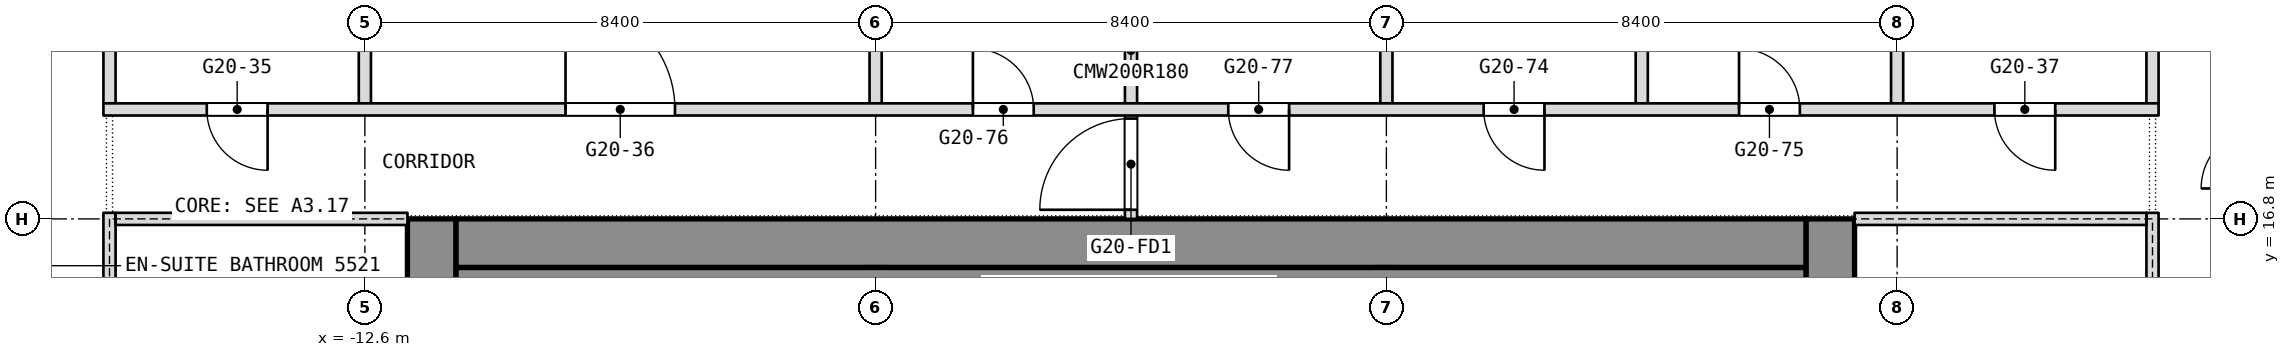
"""IFC4 building model, lengths in metres.
Left out: names, types, materials, properties, quantities, classifications, styles, units other than length and angle.
Written with IfcOpenShell. Run it as: python <this file> out.ifc"""

import sys

from ifc_helpers import new_model, si_unit, direction, frame, frame_2d, origin, place, context, subcontext, project, spatial, rectangle, extrude, element, fill, save


model = new_model("IFC4")
c1 = context("Model", 3, precision=1e-05, world=origin(), true_north=direction((0.0, 1.0)))
c2 = subcontext(c1, "Body", "Model", "MODEL_VIEW")
j1 = project(units=[si_unit("LENGTHUNIT", "METRE"), si_unit("PLANEANGLEUNIT", "RADIAN")], contexts=[c1])
p1 = place(None, origin())
s1 = spatial("IfcSite", under=j1, at=p1, CompositionType="ELEMENT")
p2 = place(p1, origin())
s2 = spatial("IfcBuilding", under=s1, at=p2, CompositionType="ELEMENT")
p3 = place(p2, frame((0.0, 0.0, 234.5)))
s3 = spatial("IfcBuildingStorey", under=s2, at=p3, CompositionType="ELEMENT", Elevation=234.5)
p4 = place(p3, frame((11.5, 0.0, 0.0), z_axis=(0.0, 0.0, 1.0), x_axis=(0.0, 1.0, 0.0)))
e1 = element("IfcWall", 1, at=p4, inside=s3, PredefinedType="SHEAR", context=c2, shape_type="SweptSolid", body=[
    extrude(rectangle(XDim=16.8, YDim=0.8, at=frame_2d((8.4, 0.0))), origin(), (0.0, 0.0, 1.0), 3.6),
])
p5 = place(p4, frame((2.3, 0.0, 0.0)))
e2 = element("IfcOpeningElement", 2, at=p5, cuts=e1, PredefinedType="OPENING", context=c2, shape_type="SweptSolid", body=[
    extrude(rectangle(XDim=1.1, YDim=2.1, at=frame_2d((0.55, 1.05))), frame((0.0, 0.4, 0.0), z_axis=(0.0, -1.0, 0.0), x_axis=(1.0, 0.0, 0.0)), (0.0, 0.0, 1.0), 0.8),
])
p6 = place(p4, frame((4.85, 0.0, 0.0)))
e3 = element("IfcOpeningElement", 3, at=p6, cuts=e1, PredefinedType="OPENING", context=c2, shape_type="SweptSolid", body=[
    extrude(rectangle(XDim=1.1, YDim=2.1, at=frame_2d((0.55, 1.05))), frame((0.0, 0.4, 0.0), z_axis=(0.0, -1.0, 0.0), x_axis=(1.0, 0.0, 0.0)), (0.0, 0.0, 1.0), 0.8),
])
p7 = place(p4, frame((6.825, 0.0, 0.0)))
e4 = element("IfcOpeningElement", 4, at=p7, cuts=e1, PredefinedType="OPENING", context=c2, shape_type="SweptSolid", body=[
    extrude(rectangle(XDim=1.2, YDim=2.1, at=frame_2d((0.6, 1.05))), frame((0.0, 0.4, 0.0), z_axis=(0.0, -1.0, 0.0), x_axis=(1.0, 0.0, 0.0)), (0.0, 0.0, 1.0), 0.8),
])
p8 = place(p4, frame((13.4, 0.0, 0.0)))
e5 = element("IfcOpeningElement", 5, at=p8, cuts=e1, PredefinedType="OPENING", context=c2, shape_type="SweptSolid", body=[
    extrude(rectangle(XDim=1.1, YDim=2.1, at=frame_2d((0.55, 1.05))), frame((0.0, 0.4, 0.0), z_axis=(0.0, -1.0, 0.0), x_axis=(1.0, 0.0, 0.0)), (0.0, 0.0, 1.0), 0.8),
])
p9 = place(p4, frame((10.85, 0.0, 0.0)))
e6 = element("IfcOpeningElement", 6, at=p9, cuts=e1, PredefinedType="OPENING", context=c2, shape_type="SweptSolid", body=[
    extrude(rectangle(XDim=1.1, YDim=2.1, at=frame_2d((0.55, 1.05))), frame((0.0, 0.4, 0.0), z_axis=(0.0, -1.0, 0.0), x_axis=(1.0, 0.0, 0.0)), (0.0, 0.0, 1.0), 0.8),
])
p10 = place(p4, frame((8.775, 0.0, 0.0)))
e7 = element("IfcOpeningElement", 7, at=p10, cuts=e1, PredefinedType="OPENING", context=c2, shape_type="SweptSolid", body=[
    extrude(rectangle(XDim=1.2, YDim=2.1, at=frame_2d((0.6, 1.05))), frame((0.0, 0.4, 0.0), z_axis=(0.0, -1.0, 0.0), x_axis=(1.0, 0.0, 0.0)), (0.0, 0.0, 1.0), 0.8),
])
p11 = place(p3, frame((-11.5, 0.0, 0.0), z_axis=(0.0, 0.0, 1.0), x_axis=(0.0, 1.0, 0.0)))
e8 = element("IfcWall", 8, at=p11, inside=s3, PredefinedType="SHEAR", context=c2, shape_type="SweptSolid", body=[
    extrude(rectangle(XDim=16.8, YDim=0.8, at=frame_2d((8.4, 0.0))), origin(), (0.0, 0.0, 1.0), 3.6),
])
p12 = place(p11, frame((3.6, 0.0, 0.0)))
e9 = element("IfcOpeningElement", 9, at=p12, cuts=e8, PredefinedType="OPENING", context=c2, shape_type="SweptSolid", body=[
    extrude(rectangle(XDim=0.9, YDim=2.1, at=frame_2d((0.45, 1.05))), frame((0.0, 0.4, 0.0), z_axis=(0.0, -1.0, 0.0), x_axis=(1.0, 0.0, 0.0)), (0.0, 0.0, 1.0), 0.8),
])
p13 = place(p11, frame((6.825, 0.0, 0.0)))
e10 = element("IfcOpeningElement", 10, at=p13, cuts=e8, PredefinedType="OPENING", context=c2, shape_type="SweptSolid", body=[
    extrude(rectangle(XDim=1.2, YDim=2.1, at=frame_2d((0.6, 1.05))), frame((0.0, 0.4, 0.0), z_axis=(0.0, -1.0, 0.0), x_axis=(1.0, 0.0, 0.0)), (0.0, 0.0, 1.0), 0.8),
])
p14 = place(p11, frame((14.212, 0.0, 0.0)))
e11 = element("IfcOpeningElement", 11, at=p14, cuts=e8, PredefinedType="OPENING", context=c2, shape_type="SweptSolid", body=[
    extrude(rectangle(XDim=0.9, YDim=2.1, at=frame_2d((0.45, 1.05))), frame((0.0, 0.4, 0.0), z_axis=(0.0, -1.0, 0.0), x_axis=(1.0, 0.0, 0.0)), (0.0, 0.0, 1.0), 0.8),
])
p15 = place(p11, frame((11.587, 0.0, 0.0)))
e12 = element("IfcOpeningElement", 12, at=p15, cuts=e8, PredefinedType="OPENING", context=c2, shape_type="SweptSolid", body=[
    extrude(rectangle(XDim=0.9, YDim=2.1, at=frame_2d((0.45, 1.05))), frame((0.0, 0.4, 0.0), z_axis=(0.0, -1.0, 0.0), x_axis=(1.0, 0.0, 0.0)), (0.0, 0.0, 1.0), 0.8),
])
p16 = place(p11, frame((8.775, 0.0, 0.0)))
e13 = element("IfcOpeningElement", 13, at=p16, cuts=e8, PredefinedType="OPENING", context=c2, shape_type="SweptSolid", body=[
    extrude(rectangle(XDim=1.2, YDim=2.1, at=frame_2d((0.6, 1.05))), frame((0.0, 0.4, 0.0), z_axis=(0.0, -1.0, 0.0), x_axis=(1.0, 0.0, 0.0)), (0.0, 0.0, 1.0), 0.8),
])
p17 = place(p3, frame((-11.1, 16.4, 0.0), z_axis=(0.0, 0.0, 1.0), x_axis=(1.0, 0.0, 0.0)))
e14 = element("IfcWall", 14, at=p17, inside=s3, PredefinedType="SHEAR", context=c2, shape_type="SweptSolid", body=[
    extrude(rectangle(XDim=22.2, YDim=0.8, at=frame_2d((11.1, 0.0))), origin(), (0.0, 0.0, 1.0), 3.6),
])
p18 = place(p3, frame((-4.2, 0.8, 0.0), z_axis=(0.0, 0.0, 1.0), x_axis=(0.0, 1.0, 0.0)))
e15 = element("IfcWall", 15, at=p18, inside=s3, PredefinedType="SHEAR", context=c2, shape_type="SweptSolid", body=[
    extrude(rectangle(XDim=15.2, YDim=0.4, at=frame_2d((7.6, 0.0))), origin(), (0.0, 0.0, 1.0), 3.6),
])
p19 = place(p18, frame((8.5, 0.0, 0.0)))
e16 = element("IfcOpeningElement", 16, at=p19, cuts=e15, PredefinedType="OPENING", context=c2, shape_type="SweptSolid", body=[
    extrude(rectangle(XDim=1.2, YDim=2.1, at=frame_2d((0.6, 1.05))), frame((0.0, 0.2, 0.0), z_axis=(0.0, -1.0, 0.0), x_axis=(1.0, 0.0, 0.0)), (0.0, 0.0, 1.0), 0.4),
])
p20 = place(p3, frame((4.2, 0.8, 0.0), z_axis=(0.0, 0.0, 1.0), x_axis=(0.0, 1.0, 0.0)))
e17 = element("IfcWall", 17, at=p20, inside=s3, PredefinedType="SHEAR", context=c2, shape_type="SweptSolid", body=[
    extrude(rectangle(XDim=15.2, YDim=0.4, at=frame_2d((7.6, 0.0))), origin(), (0.0, 0.0, 1.0), 3.6),
])
p21 = place(p20, frame((5.95, 0.0, 0.0)))
e18 = element("IfcOpeningElement", 18, at=p21, cuts=e17, PredefinedType="OPENING", context=c2, shape_type="SweptSolid", body=[
    extrude(rectangle(XDim=1.2, YDim=2.1, at=frame_2d((0.6, 1.05))), frame((0.0, 0.2, 0.0), z_axis=(0.0, -1.0, 0.0), x_axis=(1.0, 0.0, 0.0)), (0.0, 0.0, 1.0), 0.4),
])
for number, where, z_axis, x_axis in (
    (19, (16.8, 18.7, 0.0), (0.0, 0.0, 1.0), (0.0, 1.0, 0.0)),
    (20, (12.6, 18.7, 0.0), (0.0, 0.0, 1.0), (0.0, 1.0, 0.0)),
    (21, (8.4, 18.7, 0.0), (0.0, 0.0, 1.0), (0.0, 1.0, 0.0)),
    (22, (4.2, 18.7, 0.0), (0.0, 0.0, 1.0), (0.0, 1.0, 0.0)),
):
    element("IfcWall", number, at=place(p3, frame(where, z_axis=z_axis, x_axis=x_axis)), inside=s3, PredefinedType="PARTITIONING", context=c2, shape_type="SweptSolid", body=[
        extrude(rectangle(XDim=3.64, YDim=0.2, at=frame_2d((1.82, 0.0))), origin(), (0.0, 0.0, 1.0), 3.34),
    ])
p22 = place(p3, frame((0.0, 16.8, 0.0), z_axis=(0.0, 0.0, 1.0), x_axis=(0.0, 1.0, 0.0)))
e23 = element("IfcWall", 23, at=p22, inside=s3, PredefinedType="PARTITIONING", context=c2, shape_type="SweptSolid", body=[
    extrude(rectangle(XDim=5.54, YDim=0.2, at=frame_2d((2.77, 0.0))), origin(), (0.0, 0.0, 1.0), 3.34),
])
p23 = place(p22, frame((0.15, 0.0, 0.0)))
e24 = element("IfcOpeningElement", 24, at=p23, cuts=e23, PredefinedType="OPENING", context=c2, shape_type="SweptSolid", body=[
    extrude(rectangle(XDim=1.5, YDim=2.1, at=frame_2d((0.75, 1.05))), frame((0.0, 0.1, 0.0), z_axis=(0.0, -1.0, 0.0), x_axis=(1.0, 0.0, 0.0)), (0.0, 0.0, 1.0), 0.2),
])
for number, where, z_axis, x_axis in (
    (25, (-4.2, 18.7, 0.0), (0.0, 0.0, 1.0), (0.0, 1.0, 0.0)),
    (26, (-12.6, 18.7, 0.0), (0.0, 0.0, 1.0), (0.0, 1.0, 0.0)),
    (27, (-16.8, 18.7, 0.0), (0.0, 0.0, 1.0), (0.0, 1.0, 0.0)),
):
    element("IfcWall", number, at=place(p3, frame(where, z_axis=z_axis, x_axis=x_axis)), inside=s3, PredefinedType="PARTITIONING", context=c2, shape_type="SweptSolid", body=[
        extrude(rectangle(XDim=3.64, YDim=0.2, at=frame_2d((1.82, 0.0))), origin(), (0.0, 0.0, 1.0), 3.34),
    ])
p24 = place(p3, frame((-16.9, 18.6, 0.0), z_axis=(0.0, 0.0, 1.0), x_axis=(1.0, 0.0, 0.0)))
e28 = element("IfcWall", 28, at=p24, inside=s3, PredefinedType="PARTITIONING", context=c2, shape_type="SweptSolid", body=[
    extrude(rectangle(XDim=33.8, YDim=0.2, at=frame_2d((16.9, 0.0))), origin(), (0.0, 0.0, 1.0), 3.34),
])
p25 = place(p24, frame((1.7, 0.0, 0.0)))
e29 = element("IfcOpeningElement", 29, at=p25, cuts=e28, PredefinedType="OPENING", context=c2, shape_type="SweptSolid", body=[
    extrude(rectangle(XDim=1.0, YDim=2.1, at=frame_2d((0.5, 1.05))), frame((0.0, 0.1, 0.0), z_axis=(0.0, -1.0, 0.0), x_axis=(1.0, 0.0, 0.0)), (0.0, 0.0, 1.0), 0.2),
])
p26 = place(p24, frame((7.6, 0.0, 0.0)))
e30 = element("IfcOpeningElement", 30, at=p26, cuts=e28, PredefinedType="OPENING", context=c2, shape_type="SweptSolid", body=[
    extrude(rectangle(XDim=1.8, YDim=2.1, at=frame_2d((0.9, 1.05))), frame((0.0, 0.1, 0.0), z_axis=(0.0, -1.0, 0.0), x_axis=(1.0, 0.0, 0.0)), (0.0, 0.0, 1.0), 0.2),
])
p27 = place(p24, frame((31.1, 0.0, 0.0)))
e31 = element("IfcOpeningElement", 31, at=p27, cuts=e28, PredefinedType="OPENING", context=c2, shape_type="SweptSolid", body=[
    extrude(rectangle(XDim=1.0, YDim=2.1, at=frame_2d((0.5, 1.05))), frame((0.0, 0.1, 0.0), z_axis=(0.0, -1.0, 0.0), x_axis=(1.0, 0.0, 0.0)), (0.0, 0.0, 1.0), 0.2),
])
p28 = place(p24, frame((22.7, 0.0, 0.0)))
e32 = element("IfcOpeningElement", 32, at=p28, cuts=e28, PredefinedType="OPENING", context=c2, shape_type="SweptSolid", body=[
    extrude(rectangle(XDim=1.0, YDim=2.1, at=frame_2d((0.5, 1.05))), frame((0.0, 0.1, 0.0), z_axis=(0.0, -1.0, 0.0), x_axis=(1.0, 0.0, 0.0)), (0.0, 0.0, 1.0), 0.2),
])
p29 = place(p24, frame((26.9, 0.0, 0.0)))
e33 = element("IfcOpeningElement", 33, at=p29, cuts=e28, PredefinedType="OPENING", context=c2, shape_type="SweptSolid", body=[
    extrude(rectangle(XDim=1.0, YDim=2.1, at=frame_2d((0.5, 1.05))), frame((0.0, 0.1, 0.0), z_axis=(0.0, -1.0, 0.0), x_axis=(1.0, 0.0, 0.0)), (0.0, 0.0, 1.0), 0.2),
])
p30 = place(p24, frame((14.3, 0.0, 0.0)))
e34 = element("IfcOpeningElement", 34, at=p30, cuts=e28, PredefinedType="OPENING", context=c2, shape_type="SweptSolid", body=[
    extrude(rectangle(XDim=1.0, YDim=2.1, at=frame_2d((0.5, 1.05))), frame((0.0, 0.1, 0.0), z_axis=(0.0, -1.0, 0.0), x_axis=(1.0, 0.0, 0.0)), (0.0, 0.0, 1.0), 0.2),
])
p31 = place(p24, frame((18.5, 0.0, 0.0)))
e35 = element("IfcOpeningElement", 35, at=p31, cuts=e28, PredefinedType="OPENING", context=c2, shape_type="SweptSolid", body=[
    extrude(rectangle(XDim=1.0, YDim=2.1, at=frame_2d((0.5, 1.05))), frame((0.0, 0.1, 0.0), z_axis=(0.0, -1.0, 0.0), x_axis=(1.0, 0.0, 0.0)), (0.0, 0.0, 1.0), 0.2),
])
p32 = place(p3, frame((-11.1, 15.65, 0.0), z_axis=(0.0, 0.0, 1.0), x_axis=(1.0, 0.0, 0.0)))
e36 = element("IfcWall", 36, at=p32, inside=s3, PredefinedType="PARTITIONING", context=c2, shape_type="SweptSolid", body=[
    extrude(rectangle(XDim=22.2, YDim=0.7, at=frame_2d((11.1, 0.0))), origin(), (0.0, 0.0, 1.0), 3.34),
])
p33 = place(p3, frame((-16.8, -0.1, 0.0), z_axis=(0.0, 0.0, 1.0), x_axis=(0.0, 1.0, 0.0)))
e37 = element("IfcWall", 37, at=p33, inside=s3, PredefinedType="PARTITIONING", context=c2, shape_type="SweptSolid", body=[
    extrude(rectangle(XDim=17.0, YDim=0.2, at=frame_2d((8.5, 0.0))), origin(), (0.0, 0.0, 1.0), 3.34),
])
p34 = place(p33, frame((2.2, 0.0, 0.0)))
e38 = element("IfcOpeningElement", 38, at=p34, cuts=e37, PredefinedType="OPENING", context=c2, shape_type="SweptSolid", body=[
    extrude(rectangle(XDim=1.8, YDim=2.1, at=frame_2d((0.9, 1.05))), frame((0.0, 0.1, 0.0), z_axis=(0.0, -1.0, 0.0), x_axis=(1.0, 0.0, 0.0)), (0.0, 0.0, 1.0), 0.2),
])
p35 = place(p33, frame((13.0, 0.0, 0.0)))
e39 = element("IfcOpeningElement", 39, at=p35, cuts=e37, PredefinedType="OPENING", context=c2, shape_type="SweptSolid", body=[
    extrude(rectangle(XDim=1.8, YDim=2.1, at=frame_2d((0.9, 1.05))), frame((0.0, 0.1, 0.0), z_axis=(0.0, -1.0, 0.0), x_axis=(1.0, 0.0, 0.0)), (0.0, 0.0, 1.0), 0.2),
])
p36 = place(p3, frame((-16.7, 16.8, 0.0), z_axis=(0.0, 0.0, 1.0), x_axis=(1.0, 0.0, 0.0)))
e40 = element("IfcWall", 40, at=p36, inside=s3, PredefinedType="PARTITIONING", context=c2, shape_type="SweptSolid", body=[
    extrude(rectangle(XDim=4.8, YDim=0.2, at=frame_2d((2.4, 0.0))), origin(), (0.0, 0.0, 1.0), 2.94),
])
p37 = place(p3, frame((16.8, -0.1, 0.0), z_axis=(0.0, 0.0, 1.0), x_axis=(0.0, 1.0, 0.0)))
e41 = element("IfcWall", 41, at=p37, inside=s3, PredefinedType="PARTITIONING", context=c2, shape_type="SweptSolid", body=[
    extrude(rectangle(XDim=17.0, YDim=0.2, at=frame_2d((8.5, 0.0))), origin(), (0.0, 0.0, 1.0), 3.34),
])
p38 = place(p37, frame((2.2, 0.0, 0.0)))
e42 = element("IfcOpeningElement", 42, at=p38, cuts=e41, PredefinedType="OPENING", context=c2, shape_type="SweptSolid", body=[
    extrude(rectangle(XDim=1.8, YDim=2.1, at=frame_2d((0.9, 1.05))), frame((0.0, 0.1, 0.0), z_axis=(0.0, -1.0, 0.0), x_axis=(1.0, 0.0, 0.0)), (0.0, 0.0, 1.0), 0.2),
])
p39 = place(p37, frame((13.0, 0.0, 0.0)))
e43 = element("IfcOpeningElement", 43, at=p39, cuts=e41, PredefinedType="OPENING", context=c2, shape_type="SweptSolid", body=[
    extrude(rectangle(XDim=1.8, YDim=2.1, at=frame_2d((0.9, 1.05))), frame((0.0, 0.1, 0.0), z_axis=(0.0, -1.0, 0.0), x_axis=(1.0, 0.0, 0.0)), (0.0, 0.0, 1.0), 0.2),
])
p40 = place(p3, frame((11.9, 16.8, 0.0), z_axis=(0.0, 0.0, 1.0), x_axis=(1.0, 0.0, 0.0)))
e44 = element("IfcWall", 44, at=p40, inside=s3, PredefinedType="PARTITIONING", context=c2, shape_type="SweptSolid", body=[
    extrude(rectangle(XDim=4.8, YDim=0.2, at=frame_2d((2.4, 0.0))), origin(), (0.0, 0.0, 1.0), 2.94),
])
p41 = place(p25, origin())
e45 = element("IfcDoor", 45, at=p41, inside=s3, OperationType="SINGLE_SWING_LEFT", PredefinedType="DOOR", context=c2, shape_type="SweptSolid", body=[
    extrude(rectangle(XDim=1.0, YDim=2.1, at=frame_2d((0.5, 1.05))), frame((0.0, 0.025, 0.0), z_axis=(0.0, -1.0, 0.0), x_axis=(1.0, 0.0, 0.0)), (0.0, 0.0, 1.0), 0.05),
])
fill(e29, e45)
p42 = place(p26, origin())
e46 = element("IfcDoor", 46, at=p42, inside=s3, OperationType="DOUBLE_DOOR_SINGLE_SWING", PredefinedType="DOOR", context=c2, shape_type="SweptSolid", body=[
    extrude(rectangle(XDim=1.8, YDim=2.1, at=frame_2d((0.9, 1.05))), frame((0.0, 0.025, 0.0), z_axis=(0.0, -1.0, 0.0), x_axis=(1.0, 0.0, 0.0)), (0.0, 0.0, 1.0), 0.05),
])
fill(e30, e46)
p43 = place(p27, origin())
e47 = element("IfcDoor", 47, at=p43, inside=s3, OperationType="SINGLE_SWING_LEFT", PredefinedType="DOOR", context=c2, shape_type="SweptSolid", body=[
    extrude(rectangle(XDim=1.0, YDim=2.1, at=frame_2d((0.5, 1.05))), frame((0.0, 0.025, 0.0), z_axis=(0.0, -1.0, 0.0), x_axis=(1.0, 0.0, 0.0)), (0.0, 0.0, 1.0), 0.05),
])
fill(e31, e47)
p44 = place(p28, origin())
e48 = element("IfcDoor", 48, at=p44, inside=s3, OperationType="SINGLE_SWING_RIGHT", PredefinedType="DOOR", context=c2, shape_type="SweptSolid", body=[
    extrude(rectangle(XDim=1.0, YDim=2.1, at=frame_2d((0.5, 1.05))), frame((0.0, 0.025, 0.0), z_axis=(0.0, -1.0, 0.0), x_axis=(1.0, 0.0, 0.0)), (0.0, 0.0, 1.0), 0.05),
])
fill(e32, e48)
p45 = place(p29, origin())
e49 = element("IfcDoor", 49, at=p45, inside=s3, OperationType="SINGLE_SWING_LEFT", PredefinedType="DOOR", context=c2, shape_type="SweptSolid", body=[
    extrude(rectangle(XDim=1.0, YDim=2.1, at=frame_2d((0.5, 1.05))), frame((0.0, 0.025, 0.0), z_axis=(0.0, -1.0, 0.0), x_axis=(1.0, 0.0, 0.0)), (0.0, 0.0, 1.0), 0.05),
])
fill(e33, e49)
p46 = place(p30, origin())
e50 = element("IfcDoor", 50, at=p46, inside=s3, OperationType="SINGLE_SWING_RIGHT", PredefinedType="DOOR", context=c2, shape_type="SweptSolid", body=[
    extrude(rectangle(XDim=1.0, YDim=2.1, at=frame_2d((0.5, 1.05))), frame((0.0, 0.025, 0.0), z_axis=(0.0, -1.0, 0.0), x_axis=(1.0, 0.0, 0.0)), (0.0, 0.0, 1.0), 0.05),
])
fill(e34, e50)
p47 = place(p31, origin())
e51 = element("IfcDoor", 51, at=p47, inside=s3, OperationType="SINGLE_SWING_LEFT", PredefinedType="DOOR", context=c2, shape_type="SweptSolid", body=[
    extrude(rectangle(XDim=1.0, YDim=2.1, at=frame_2d((0.5, 1.05))), frame((0.0, 0.025, 0.0), z_axis=(0.0, -1.0, 0.0), x_axis=(1.0, 0.0, 0.0)), (0.0, 0.0, 1.0), 0.05),
])
fill(e35, e51)
p48 = place(p23, origin())
e52 = element("IfcDoor", 52, at=p48, inside=s3, OperationType="DOUBLE_DOOR_DOUBLE_SWING", PredefinedType="DOOR", context=c2, shape_type="SweptSolid", body=[
    extrude(rectangle(XDim=1.5, YDim=2.1, at=frame_2d((0.75, 1.05))), frame((0.0, 0.025, 0.0), z_axis=(0.0, -1.0, 0.0), x_axis=(1.0, 0.0, 0.0)), (0.0, 0.0, 1.0), 0.05),
])
fill(e24, e52)
save(model, sys.argv[1])
